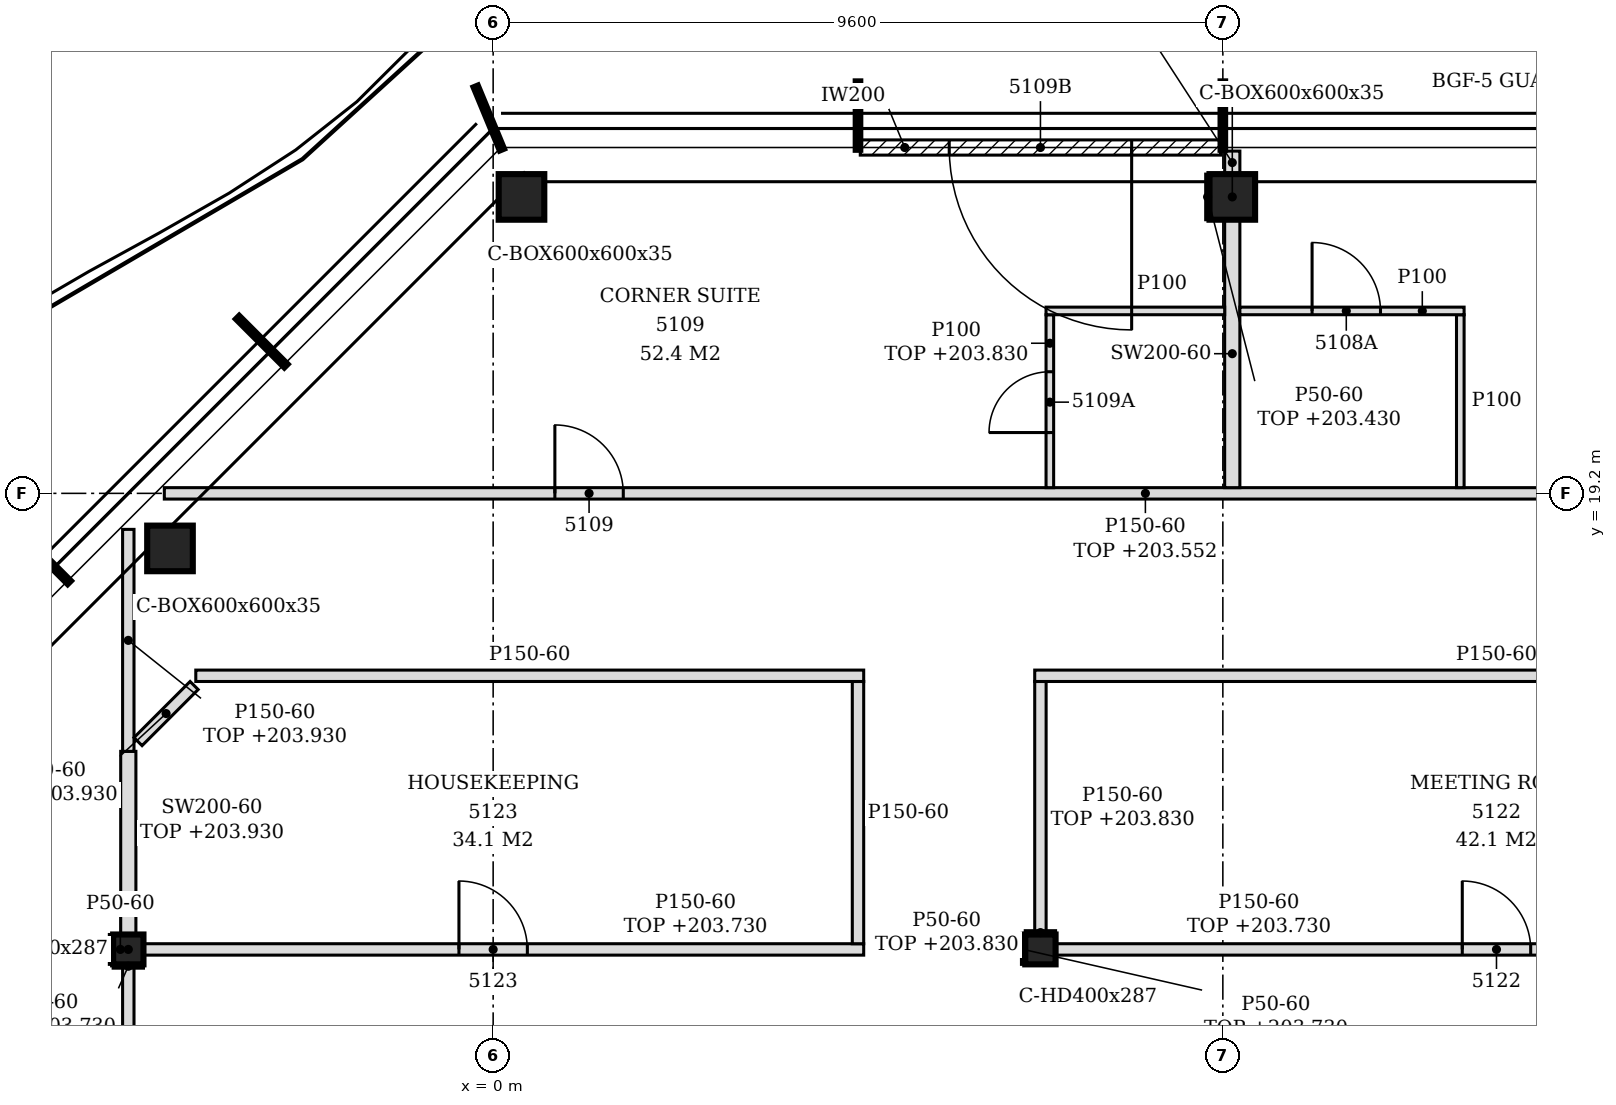
"""IFC4 building model, lengths in metres.
Left out: names, types, materials, properties, quantities, classifications, styles, units other than length and angle.
Written with IfcOpenShell. Run it as: python <this file> out.ifc"""

import sys

from ifc_helpers import new_model, si_unit, direction, frame, frame_2d, origin, origin_2d, place, context, subcontext, project, spatial, polyline, rectangle, hollow_rectangle, i_section, outline, extrude, clip, halfspace, element, fill, save


model = new_model("IFC4")
c1 = context("Model", 3, precision=1e-05, world=origin(), true_north=direction((0.0, 1.0)))
c2 = subcontext(c1, "Body", "Model", "MODEL_VIEW")
j1 = project(units=[si_unit("LENGTHUNIT", "METRE"), si_unit("PLANEANGLEUNIT", "RADIAN")], contexts=[c1])
p1 = place(None, origin())
s1 = spatial("IfcSite", under=j1, at=p1, CompositionType="ELEMENT")
p2 = place(p1, origin())
s2 = spatial("IfcBuilding", under=s1, at=p2, CompositionType="ELEMENT")
p3 = place(p2, frame((0.0, 0.0, 201.0)))
s3 = spatial("IfcBuildingStorey", under=s2, at=p3, CompositionType="ELEMENT", Elevation=201.0)
for number, where, z_axis, x_axis in (
    (1, (9.724, 23.1, -0.15), (0.0, 0.0, 1.0), (1.0, 0.0, 0.0)),
    (2, (0.373, 23.1, -0.15), (0.0, 0.0, 1.0), (1.0, 0.0, 0.0)),
    (3, (-4.251, 18.476, -0.15), (0.0, 0.0, 1.0), (1.0, 0.0, 0.0)),
):
    element("IfcColumn", number, at=place(p3, frame(where, z_axis=z_axis, x_axis=x_axis)), inside=s3, PredefinedType="COLUMN", context=c2, shape_type="Clipping", body=[
        clip(clip(extrude(hollow_rectangle(XDim=0.6, YDim=0.6, WallThickness=0.035, at=origin_2d()), origin(), (0.0, 0.0, 1.0), 3.5), halfspace(frame((0.0, 0.0, 0.011), z_axis=(0.0, 0.0, 1.0), x_axis=(1.0, 0.0, 0.0)), True)), halfspace(frame((0.0, 0.0, 3.095), z_axis=(0.0, 0.0, 1.0), x_axis=(1.0, 0.0, 0.0)), False)),
    ])
for number, where, z_axis, x_axis in (
    (4, (-4.8, 13.2, -0.15), (0.0, 0.0, 1.0), (1.0, 0.0, 0.0)),
    (5, (7.2, 13.2, -0.15), (0.0, 0.0, 1.0), (1.0, 0.0, 0.0)),
):
    element("IfcColumn", number, at=place(p3, frame(where, z_axis=z_axis, x_axis=x_axis)), inside=s3, PredefinedType="COLUMN", context=c2, shape_type="SweptSolid", body=[
        extrude(i_section(OverallWidth=0.399, OverallDepth=0.393, WebThickness=0.023, FlangeThickness=0.037, FilletRadius=0.015, at=origin_2d()), origin(), (0.0, 0.0, 1.0), 3.5),
    ])
p4 = place(p3, frame((9.57, 23.75, 0.0), z_axis=(0.0, 0.0, 1.0), x_axis=(-1.0, 0.0, 0.0)))
e6 = element("IfcWall", 6, at=p4, inside=s3, PredefinedType="NOTDEFINED", context=c2, shape_type="SweptSolid", body=[
    extrude(rectangle(XDim=4.74, YDim=0.2, at=frame_2d((2.37, 0.0))), origin(), (0.0, 0.0, 1.0), 3.35),
])
p5 = place(p4, frame((1.17, 0.0, 0.0)))
e7 = element("IfcOpeningElement", 7, at=p5, cuts=e6, PredefinedType="OPENING", context=c2, shape_type="SweptSolid", body=[
    extrude(rectangle(XDim=2.4, YDim=2.4, at=frame_2d((1.2, 1.2))), frame((0.0, 0.11, 0.0), z_axis=(0.0, -1.0, 0.0), x_axis=(1.0, 0.0, 0.0)), (0.0, 0.0, 1.0), 0.22),
])
p6 = place(p3, frame((-4.8, 2.596, 0.0), z_axis=(0.0, 0.0, 1.0), x_axis=(0.0, 1.0, 0.0)))
e8 = element("IfcWall", 8, at=p6, inside=s3, PredefinedType="PARTITIONING", context=c2, shape_type="SweptSolid", body=[
    extrude(rectangle(XDim=10.407, YDim=0.15, at=frame_2d((5.204, 0.0))), origin(), (0.0, 0.0, 1.0), 2.73),
])
p7 = place(p6, frame((3.553, 0.0, 0.0)))
e9 = element("IfcOpeningElement", 9, at=p7, cuts=e8, PredefinedType="OPENING", context=c2, shape_type="SweptSolid", body=[
    extrude(rectangle(XDim=0.9, YDim=2.1, at=frame_2d((0.45, 1.05))), frame((0.0, 0.085, 0.0), z_axis=(0.0, -1.0, 0.0), x_axis=(1.0, 0.0, 0.0)), (0.0, 0.0, 1.0), 0.17),
])
p8 = place(p3, frame((-4.601, 13.2, 0.0), z_axis=(0.0, 0.0, 1.0), x_axis=(1.0, 0.0, 0.0)))
e10 = element("IfcWall", 10, at=p8, inside=s3, PredefinedType="PARTITIONING", context=c2, shape_type="SweptSolid", body=[
    extrude(rectangle(XDim=9.476, YDim=0.15, at=frame_2d((4.738, 0.0))), origin(), (0.0, 0.0, 1.0), 2.73),
])
p9 = place(p8, frame((4.15, 0.0, 0.0)))
e11 = element("IfcOpeningElement", 11, at=p9, cuts=e10, PredefinedType="OPENING", context=c2, shape_type="SweptSolid", body=[
    extrude(rectangle(XDim=0.9, YDim=2.1, at=frame_2d((0.45, 1.05))), frame((0.0, 0.085, 0.0), z_axis=(0.0, -1.0, 0.0), x_axis=(1.0, 0.0, 0.0)), (0.0, 0.0, 1.0), 0.17),
])
p10 = place(p3, frame((7.399, 13.2, 0.0), z_axis=(0.0, 0.0, 1.0), x_axis=(1.0, 0.0, 0.0)))
e12 = element("IfcWall", 12, at=p10, inside=s3, PredefinedType="PARTITIONING", context=c2, shape_type="SweptSolid", body=[
    extrude(rectangle(XDim=11.601, YDim=0.15, at=frame_2d((5.801, 0.0))), origin(), (0.0, 0.0, 1.0), 2.73),
])
p11 = place(p10, frame((5.351, 0.0, 0.0)))
e13 = element("IfcOpeningElement", 13, at=p11, cuts=e12, PredefinedType="OPENING", context=c2, shape_type="SweptSolid", body=[
    extrude(rectangle(XDim=0.9, YDim=2.1, at=frame_2d((0.45, 1.05))), frame((0.0, 0.085, 0.0), z_axis=(0.0, -1.0, 0.0), x_axis=(1.0, 0.0, 0.0)), (0.0, 0.0, 1.0), 0.17),
])
p12 = place(p3, frame((4.8, 13.275, 0.0), z_axis=(0.0, 0.0, 1.0), x_axis=(0.0, 1.0, 0.0)))
e14 = element("IfcWall", 14, at=p12, inside=s3, PredefinedType="PARTITIONING", context=c2, shape_type="SweptSolid", body=[
    extrude(outline(polyline([(0.0, 0.0), (3.45, 0.0), (3.45, 3.35), (0.075, 3.35), (0.073, 2.73), (0.0, 2.73), (0.0, 0.0)])), frame((0.0, 0.075, 0.0), z_axis=(0.0, -1.0, 0.0), x_axis=(1.0, 0.0, 0.0)), (0.0, 0.0, 1.0), 0.15),
])
p13 = place(p3, frame((-4.8, 13.396, 0.0), z_axis=(0.0, 0.0, 1.0), x_axis=(0.0, 1.0, 0.0)))
e15 = element("IfcWall", 15, at=p13, inside=s3, PredefinedType="PARTITIONING", context=c2, shape_type="SweptSolid", body=[
    extrude(rectangle(XDim=2.409, YDim=0.2, at=frame_2d((1.205, 0.0))), origin(), (0.0, 0.0, 1.0), 2.93),
])
p14 = place(p3, frame((7.2, 13.396, 0.0), z_axis=(0.0, 0.0, 1.0), x_axis=(0.0, 1.0, 0.0)))
e16 = element("IfcWall", 16, at=p14, inside=s3, PredefinedType="PARTITIONING", context=c2, shape_type="SweptSolid", body=[
    extrude(rectangle(XDim=3.329, YDim=0.15, at=frame_2d((1.664, 0.0))), origin(), (0.0, 0.0, 1.0), 2.83),
])
p15 = place(p3, frame((-4.8, 15.806, 0.0), z_axis=(0.0, 0.0, 1.0), x_axis=(0.0, 1.0, 0.0)))
e17 = element("IfcWall", 17, at=p15, inside=s3, PredefinedType="PARTITIONING", context=c2, shape_type="SweptSolid", body=[
    extrude(outline(polyline([(0.0, 0.0), (2.92, 0.0), (2.92, 2.93), (2.833, 2.93), (2.831, 2.43), (1.41, 2.43), (1.408, 2.93), (0.0, 2.93), (0.0, 0.0)])), frame((0.0, 0.075, 0.0), z_axis=(0.0, -1.0, 0.0), x_axis=(1.0, 0.0, 0.0)), (0.0, 0.0, 1.0), 0.15),
])
p16 = place(p3, frame((-4.672, 15.934, 0.0), z_axis=(0.0, 0.0, 1.0), x_axis=(0.707106781187, 0.707106781187, 0.0)))
e18 = element("IfcWall", 18, at=p16, inside=s3, PredefinedType="PARTITIONING", context=c2, shape_type="SweptSolid", body=[
    extrude(rectangle(XDim=1.044, YDim=0.15, at=frame_2d((0.522, 0.0))), origin(), (0.0, 0.0, 1.0), 2.93),
])
p17 = place(p3, frame((-3.912, 16.8, 0.0), z_axis=(0.0, 0.0, 1.0), x_axis=(1.0, 0.0, 0.0)))
e19 = element("IfcWall", 19, at=p17, inside=s3, PredefinedType="PARTITIONING", context=c2, shape_type="SweptSolid", body=[
    extrude(rectangle(XDim=8.787, YDim=0.15, at=frame_2d((4.394, 0.0))), origin(), (0.0, 0.0, 1.0), 3.35),
])
p18 = place(p3, frame((7.125, 16.8, 0.0), z_axis=(0.0, 0.0, 1.0), x_axis=(1.0, 0.0, 0.0)))
e20 = element("IfcWall", 20, at=p18, inside=s3, PredefinedType="PARTITIONING", context=c2, shape_type="SweptSolid", body=[
    extrude(outline(polyline([(0.0, 0.0), (12.15, 0.0), (12.15, 2.322), (11.924, 2.322), (11.922, 3.35), (0.225, 3.35), (0.223, 2.83), (0.0, 2.83), (0.0, 0.0)])), frame((0.0, 0.075, 0.0), z_axis=(0.0, -1.0, 0.0), x_axis=(1.0, 0.0, 0.0)), (0.0, 0.0, 1.0), 0.15),
])
p19 = place(p3, frame((-4.326, 19.2, 0.0), z_axis=(0.0, 0.0, 1.0), x_axis=(1.0, 0.0, 0.0)))
e21 = element("IfcWall", 21, at=p19, inside=s3, PredefinedType="PARTITIONING", context=c2, shape_type="SweptSolid", body=[
    extrude(outline(polyline([(0.0, 0.0), (31.244, 0.0), (31.244, 2.552), (23.677, 2.552), (23.675, 2.322), (23.375, 2.322), (23.373, 2.552), (1.51, 2.552), (1.508, 2.43), (0.087, 2.43), (0.085, 2.552), (0.0, 2.552), (0.0, 0.0)])), frame((0.0, 0.075, 0.0), z_axis=(0.0, -1.0, 0.0), x_axis=(1.0, 0.0, 0.0)), (0.0, 0.0, 1.0), 0.15),
])
p20 = place(p19, frame((28.02, 0.0, 0.0)))
e22 = element("IfcOpeningElement", 22, at=p20, cuts=e21, PredefinedType="OPENING", context=c2, shape_type="SweptSolid", body=[
    extrude(rectangle(XDim=0.9, YDim=2.1, at=frame_2d((0.45, 1.05))), frame((0.0, 0.085, 0.0), z_axis=(0.0, -1.0, 0.0), x_axis=(1.0, 0.0, 0.0)), (0.0, 0.0, 1.0), 0.17),
])
p21 = place(p19, frame((19.776, 0.0, 0.0)))
e23 = element("IfcOpeningElement", 23, at=p21, cuts=e21, PredefinedType="OPENING", context=c2, shape_type="SweptSolid", body=[
    extrude(rectangle(XDim=0.9, YDim=2.1, at=frame_2d((0.45, 1.05))), frame((0.0, 0.085, 0.0), z_axis=(0.0, -1.0, 0.0), x_axis=(1.0, 0.0, 0.0)), (0.0, 0.0, 1.0), 0.17),
])
p22 = place(p19, frame((5.138, 0.0, 0.0)))
e24 = element("IfcOpeningElement", 24, at=p22, cuts=e21, PredefinedType="OPENING", context=c2, shape_type="SweptSolid", body=[
    extrude(rectangle(XDim=0.9, YDim=2.1, at=frame_2d((0.45, 1.05))), frame((0.0, 0.085, 0.0), z_axis=(0.0, -1.0, 0.0), x_axis=(1.0, 0.0, 0.0)), (0.0, 0.0, 1.0), 0.17),
])
p23 = place(p3, frame((7.324, 19.275, 0.0), z_axis=(0.0, 0.0, 1.0), x_axis=(0.0, 1.0, 0.0)))
e25 = element("IfcWall", 25, at=p23, inside=s3, PredefinedType="PARTITIONING", context=c2, shape_type="SweptSolid", body=[
    extrude(outline(polyline([(0.0, 0.0), (2.275, 0.0), (2.275, 2.83), (0.03, 2.83), (0.028, 2.78), (0.0, 2.78), (0.0, 0.0)])), frame((0.0, 0.05, 0.0), z_axis=(0.0, -1.0, 0.0), x_axis=(1.0, 0.0, 0.0)), (0.0, 0.0, 1.0), 0.1),
])
p24 = place(p23, frame((0.725, 0.0, 0.0)))
e26 = element("IfcOpeningElement", 26, at=p24, cuts=e25, PredefinedType="OPENING", context=c2, shape_type="SweptSolid", body=[
    extrude(rectangle(XDim=0.8, YDim=2.1, at=frame_2d((0.4, 1.05))), frame((0.0, 0.06, 0.0), z_axis=(0.0, -1.0, 0.0), x_axis=(1.0, 0.0, 0.0)), (0.0, 0.0, 1.0), 0.12),
])
p25 = place(p3, frame((9.724, 19.275, 0.0), z_axis=(0.0, 0.0, 1.0), x_axis=(0.0, 1.0, 0.0)))
e27 = element("IfcWall", 27, at=p25, inside=s3, PredefinedType="PARTITIONING", context=c2, shape_type="SweptSolid", body=[
    extrude(outline(polyline([(0.0, 0.0), (3.525, 0.0), (3.525, 2.43), (3.375, 2.43), (3.373, 3.35), (0.03, 3.35), (0.028, 2.78), (0.0, 2.78), (0.0, 0.0)])), frame((0.0, 0.1, 0.0), z_axis=(0.0, -1.0, 0.0), x_axis=(1.0, 0.0, 0.0)), (0.0, 0.0, 1.0), 0.2),
])
p26 = place(p3, frame((12.724, 19.275, 0.0), z_axis=(0.0, 0.0, 1.0), x_axis=(0.0, 1.0, 0.0)))
e28 = element("IfcWall", 28, at=p26, inside=s3, PredefinedType="PARTITIONING", context=c2, shape_type="SweptSolid", body=[
    extrude(outline(polyline([(0.0, 0.0), (2.275, 0.0), (2.275, 3.35), (0.03, 3.35), (0.028, 2.78), (0.0, 2.78), (0.0, 0.0)])), frame((0.0, 0.05, 0.0), z_axis=(0.0, -1.0, 0.0), x_axis=(1.0, 0.0, 0.0)), (0.0, 0.0, 1.0), 0.1),
])
p27 = place(p3, frame((7.274, 21.6, 0.0), z_axis=(0.0, 0.0, 1.0), x_axis=(1.0, 0.0, 0.0)))
e29 = element("IfcWall", 29, at=p27, inside=s3, PredefinedType="PARTITIONING", context=c2, shape_type="SweptSolid", body=[
    extrude(outline(polyline([(0.0, 0.0), (2.35, 0.0), (2.35, 3.35), (0.076, 3.35), (0.074, 2.83), (0.0, 2.83), (0.0, 0.0)])), frame((0.0, 0.05, 0.0), z_axis=(0.0, -1.0, 0.0), x_axis=(1.0, 0.0, 0.0)), (0.0, 0.0, 1.0), 0.1),
])
p28 = place(p3, frame((9.824, 21.6, 0.0), z_axis=(0.0, 0.0, 1.0), x_axis=(1.0, 0.0, 0.0)))
e30 = element("IfcWall", 30, at=p28, inside=s3, PredefinedType="PARTITIONING", context=c2, shape_type="SweptSolid", body=[
    extrude(rectangle(XDim=2.95, YDim=0.1, at=frame_2d((1.475, 0.0))), origin(), (0.0, 0.0, 1.0), 3.35),
])
p29 = place(p28, frame((0.95, 0.0, 0.0)))
e31 = element("IfcOpeningElement", 31, at=p29, cuts=e30, PredefinedType="OPENING", context=c2, shape_type="SweptSolid", body=[
    extrude(rectangle(XDim=0.9, YDim=2.1, at=frame_2d((0.45, 1.05))), frame((0.0, 0.06, 0.0), z_axis=(0.0, -1.0, 0.0), x_axis=(1.0, 0.0, 0.0)), (0.0, 0.0, 1.0), 0.12),
])
p30 = place(p3, frame((9.724, 23.4, 0.0), z_axis=(0.0, 0.0, 1.0), x_axis=(0.0, 1.0, 0.0)))
e32 = element("IfcWall", 32, at=p30, inside=s3, PredefinedType="PARTITIONING", context=c2, shape_type="SweptSolid", body=[
    extrude(outline(polyline([(0.0, 0.0), (0.303, 0.0), (0.303, 3.35), (0.15, 3.35), (0.148, 2.43), (0.0, 2.43), (0.0, 0.0)])), frame((0.0, 0.1, 0.0), z_axis=(0.0, -1.0, 0.0), x_axis=(1.0, 0.0, 0.0)), (0.0, 0.0, 1.0), 0.2),
])
p31 = place(p3, frame((-5.024, 13.003, 0.0), z_axis=(0.0, 0.0, 1.0), x_axis=(0.0, 1.0, 0.0)))
e33 = element("IfcWall", 33, at=p31, inside=s3, PredefinedType="PARTITIONING", context=c2, shape_type="SweptSolid", body=[
    extrude(rectangle(XDim=0.393, YDim=0.05, at=frame_2d((0.197, 0.0))), origin(), (0.0, 0.0, 1.0), 3.35),
])
p32 = place(p3, frame((-5.0, 12.979, 0.0), z_axis=(0.0, 0.0, 1.0), x_axis=(1.0, 0.0, 0.0)))
e34 = element("IfcWall", 34, at=p32, inside=s3, PredefinedType="PARTITIONING", context=c2, shape_type="SweptSolid", body=[
    extrude(rectangle(XDim=0.399, YDim=0.05, at=frame_2d((0.199, 0.0))), origin(), (0.0, 0.0, 1.0), 2.73),
])
p33 = place(p3, frame((7.0, 13.421, 0.0), z_axis=(0.0, 0.0, 1.0), x_axis=(1.0, 0.0, 0.0)))
e35 = element("IfcWall", 35, at=p33, inside=s3, PredefinedType="PARTITIONING", context=c2, shape_type="SweptSolid", body=[
    extrude(rectangle(XDim=0.399, YDim=0.05, at=frame_2d((0.199, 0.0))), origin(), (0.0, 0.0, 1.0), 2.83),
])
p34 = place(p3, frame((6.976, 13.003, 0.0), z_axis=(0.0, 0.0, 1.0), x_axis=(0.0, 1.0, 0.0)))
e36 = element("IfcWall", 36, at=p34, inside=s3, PredefinedType="PARTITIONING", context=c2, shape_type="SweptSolid", body=[
    extrude(rectangle(XDim=0.393, YDim=0.05, at=frame_2d((0.197, 0.0))), origin(), (0.0, 0.0, 1.0), 2.73),
])
p35 = place(p3, frame((9.399, 22.8, 0.0), z_axis=(0.0, 0.0, 1.0), x_axis=(0.0, 1.0, 0.0)))
e37 = element("IfcWall", 37, at=p35, inside=s3, PredefinedType="PARTITIONING", context=c2, shape_type="SweptSolid", body=[
    extrude(rectangle(XDim=0.6, YDim=0.05, at=frame_2d((0.3, 0.0))), origin(), (0.0, 0.0, 1.0), 2.43),
])
p36 = place(p5, origin())
e38 = element("IfcDoor", 38, at=p36, inside=s3, OperationType="SINGLE_SWING_LEFT", PredefinedType="DOOR", context=c2, shape_type="SweptSolid", body=[
    extrude(rectangle(XDim=2.4, YDim=2.4, at=frame_2d((1.2, 1.2))), frame((0.0, 0.025, 0.0), z_axis=(0.0, -1.0, 0.0), x_axis=(1.0, 0.0, 0.0)), (0.0, 0.0, 1.0), 0.05),
])
fill(e7, e38)
p37 = place(p29, origin())
e39 = element("IfcDoor", 39, at=p37, inside=s3, OperationType="SINGLE_SWING_LEFT", PredefinedType="DOOR", context=c2, shape_type="SweptSolid", body=[
    extrude(rectangle(XDim=0.9, YDim=2.1, at=frame_2d((0.45, 1.05))), frame((0.0, 0.025, 0.0), z_axis=(0.0, -1.0, 0.0), x_axis=(1.0, 0.0, 0.0)), (0.0, 0.0, 1.0), 0.05),
])
fill(e31, e39)
p38 = place(p22, origin())
e40 = element("IfcDoor", 40, at=p38, inside=s3, OperationType="SINGLE_SWING_LEFT", PredefinedType="DOOR", context=c2, shape_type="SweptSolid", body=[
    extrude(rectangle(XDim=0.9, YDim=2.1, at=frame_2d((0.45, 1.05))), frame((0.0, 0.025, 0.0), z_axis=(0.0, -1.0, 0.0), x_axis=(1.0, 0.0, 0.0)), (0.0, 0.0, 1.0), 0.05),
])
fill(e24, e40)
p39 = place(p24, origin())
e41 = element("IfcDoor", 41, at=p39, inside=s3, OperationType="SINGLE_SWING_LEFT", PredefinedType="DOOR", context=c2, shape_type="SweptSolid", body=[
    extrude(rectangle(XDim=0.8, YDim=2.1, at=frame_2d((0.4, 1.05))), frame((0.0, 0.025, 0.0), z_axis=(0.0, -1.0, 0.0), x_axis=(1.0, 0.0, 0.0)), (0.0, 0.0, 1.0), 0.05),
])
fill(e26, e41)
p40 = place(p11, origin())
e42 = element("IfcDoor", 42, at=p40, inside=s3, OperationType="SINGLE_SWING_LEFT", PredefinedType="DOOR", context=c2, shape_type="SweptSolid", body=[
    extrude(rectangle(XDim=0.9, YDim=2.1, at=frame_2d((0.45, 1.05))), frame((0.0, 0.025, 0.0), z_axis=(0.0, -1.0, 0.0), x_axis=(1.0, 0.0, 0.0)), (0.0, 0.0, 1.0), 0.05),
])
fill(e13, e42)
p41 = place(p9, origin())
e43 = element("IfcDoor", 43, at=p41, inside=s3, OperationType="SINGLE_SWING_LEFT", PredefinedType="DOOR", context=c2, shape_type="SweptSolid", body=[
    extrude(rectangle(XDim=0.9, YDim=2.1, at=frame_2d((0.45, 1.05))), frame((0.0, 0.025, 0.0), z_axis=(0.0, -1.0, 0.0), x_axis=(1.0, 0.0, 0.0)), (0.0, 0.0, 1.0), 0.05),
])
fill(e11, e43)
save(model, sys.argv[1])
